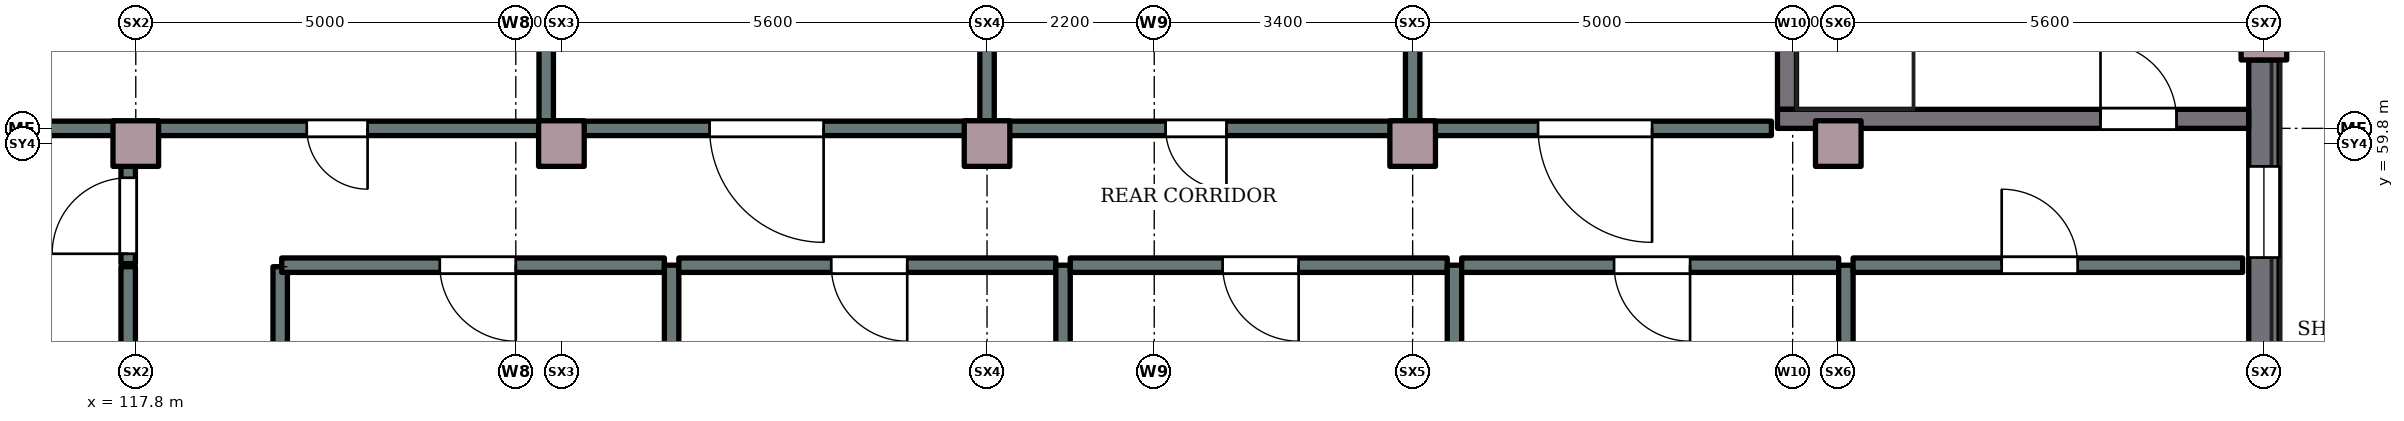
"""IFC4 building model, lengths in metres.
Left out: names, types, materials, properties, quantities, classifications, styles, units other than length and angle.
Written with IfcOpenShell. Run it as: python <this file> out.ifc"""

import sys

from ifc_helpers import new_model, si_unit, direction, frame, frame_2d, origin, origin_2d, place, context, subcontext, project, spatial, rectangle, extrude, element, fill, save


model = new_model("IFC4")
c1 = context("Model", 3, precision=1e-05, world=origin(), true_north=direction((0.0, 1.0)))
c2 = subcontext(c1, "Body", "Model", "MODEL_VIEW")
j1 = project(units=[si_unit("LENGTHUNIT", "METRE"), si_unit("PLANEANGLEUNIT", "RADIAN")], contexts=[c1])
p1 = place(None, origin())
s1 = spatial("IfcSite", under=j1, at=p1, CompositionType="ELEMENT")
p2 = place(p1, origin())
s2 = spatial("IfcBuilding", under=s1, at=p2, CompositionType="ELEMENT")
p3 = place(p2, origin())
s3 = spatial("IfcBuildingStorey", under=s2, at=p3, CompositionType="ELEMENT", Elevation=0.0)
for number, where, z_axis, x_axis in (
    (1, (145.8, 61.2, 0.0), (0.0, 0.0, 1.0), (1.0, 0.0, 0.0)),
    (2, (117.8, 59.8, 0.0), (0.0, 0.0, 1.0), (1.0, 0.0, 0.0)),
    (3, (123.4, 59.8, 0.0), (0.0, 0.0, 1.0), (1.0, 0.0, 0.0)),
    (4, (129.0, 59.8, 0.0), (0.0, 0.0, 1.0), (1.0, 0.0, 0.0)),
    (5, (134.6, 59.8, 0.0), (0.0, 0.0, 1.0), (1.0, 0.0, 0.0)),
    (6, (140.2, 59.8, 0.0), (0.0, 0.0, 1.0), (1.0, 0.0, 0.0)),
):
    element("IfcColumn", number, at=place(p3, frame(where, z_axis=z_axis, x_axis=x_axis)), inside=s3, PredefinedType="COLUMN", context=c2, shape_type="SweptSolid", body=[
        extrude(rectangle(XDim=0.6, YDim=0.6, at=origin_2d()), origin(), (0.0, 0.0, 1.0), 4.2),
    ])
p4 = place(p3, frame((145.8, 56.9, 0.0), z_axis=(0.0, 0.0, 1.0), x_axis=(0.0, 1.0, 0.0)))
e7 = element("IfcWall", 7, at=p4, inside=s3, PredefinedType="SOLIDWALL", context=c2, shape_type="SweptSolid", body=[
    extrude(rectangle(XDim=4.0, YDim=0.4, at=frame_2d((2.0, 0.0))), origin(), (0.0, 0.0, 1.0), 4.2),
])
p5 = place(p4, frame((1.4, 0.0, 1.2)))
e8 = element("IfcOpeningElement", 8, at=p5, cuts=e7, PredefinedType="OPENING", context=c2, shape_type="SweptSolid", body=[
    extrude(rectangle(XDim=1.2, YDim=1.8, at=frame_2d((0.6, 0.9))), frame((0.0, 0.21, 0.0), z_axis=(0.0, -1.0, 0.0), x_axis=(1.0, 0.0, 0.0)), (0.0, 0.0, 1.0), 0.42),
])
p6 = place(p3, frame((139.525, 60.25, 0.0), z_axis=(0.0, 0.0, 1.0), x_axis=(0.0, 1.0, 0.0)))
e9 = element("IfcWall", 9, at=p6, inside=s3, PredefinedType="SHEAR", context=c2, shape_type="SweptSolid", body=[
    extrude(rectangle(XDim=5.35, YDim=0.25, at=frame_2d((2.675, 0.0))), origin(), (0.0, 0.0, 1.0), 4.2),
])
p7 = place(p3, frame((139.4, 60.125, 0.0), z_axis=(0.0, 0.0, 1.0), x_axis=(1.0, 0.0, 0.0)))
e10 = element("IfcWall", 10, at=p7, inside=s3, PredefinedType="SHEAR", context=c2, shape_type="SweptSolid", body=[
    extrude(rectangle(XDim=6.2, YDim=0.25, at=frame_2d((3.1, 0.0))), origin(), (0.0, 0.0, 1.0), 4.2),
])
p8 = place(p7, frame((4.25, 0.0, 0.0)))
e11 = element("IfcOpeningElement", 11, at=p8, cuts=e10, PredefinedType="OPENING", context=c2, shape_type="SweptSolid", body=[
    extrude(rectangle(XDim=1.0, YDim=2.1, at=frame_2d((0.5, 1.05))), frame((0.0, 0.135, 0.0), z_axis=(0.0, -1.0, 0.0), x_axis=(1.0, 0.0, 0.0)), (0.0, 0.0, 1.0), 0.27),
])
p9 = place(p3, frame((117.605, 60.0, 0.0), z_axis=(0.0, 0.0, 1.0), x_axis=(-1.0, 0.0, 0.0)))
e12 = element("IfcWall", 12, at=p9, inside=s3, PredefinedType="PARTITIONING", context=c2, shape_type="SweptSolid", body=[
    extrude(rectangle(XDim=5.125, YDim=0.19, at=frame_2d((2.562, 0.0))), origin(), (0.0, 0.0, 1.0), 3.9),
])
p10 = place(p3, frame((117.7, 46.6, 0.0), z_axis=(0.0, 0.0, 1.0), x_axis=(0.0, 1.0, 0.0)))
e13 = element("IfcWall", 13, at=p10, inside=s3, PredefinedType="PARTITIONING", context=c2, shape_type="SweptSolid", body=[
    extrude(rectangle(XDim=11.58, YDim=0.19, at=frame_2d((5.79, 0.0))), origin(), (0.0, 0.0, 1.0), 3.9),
])
p11 = place(p10, frame((5.35, 0.0, 0.0)))
e14 = element("IfcOpeningElement", 14, at=p11, cuts=e13, PredefinedType="OPENING", context=c2, shape_type="SweptSolid", body=[
    extrude(rectangle(XDim=1.0, YDim=2.1, at=frame_2d((0.5, 1.05))), frame((0.0, 0.105, 0.0), z_axis=(0.0, -1.0, 0.0), x_axis=(1.0, 0.0, 0.0)), (0.0, 0.0, 1.0), 0.21),
])
p12 = place(p3, frame((117.7, 58.22, 0.0), z_axis=(0.0, 0.0, 1.0), x_axis=(0.0, 1.0, 0.0)))
e15 = element("IfcWall", 15, at=p12, inside=s3, PredefinedType="PARTITIONING", context=c2, shape_type="SweptSolid", body=[
    extrude(rectangle(XDim=1.78, YDim=0.19, at=frame_2d((0.89, 0.0))), origin(), (0.0, 0.0, 1.0), 3.9),
])
p13 = place(p12, frame((0.13, 0.0, 0.0)))
e16 = element("IfcOpeningElement", 16, at=p13, cuts=e15, PredefinedType="OPENING", context=c2, shape_type="SweptSolid", body=[
    extrude(rectangle(XDim=1.0, YDim=2.1, at=frame_2d((0.5, 1.05))), frame((0.0, 0.105, 0.0), z_axis=(0.0, -1.0, 0.0), x_axis=(1.0, 0.0, 0.0)), (0.0, 0.0, 1.0), 0.21),
])
p14 = place(p3, frame((119.7, 53.0, 0.0), z_axis=(0.0, 0.0, 1.0), x_axis=(0.0, 1.0, 0.0)))
e17 = element("IfcWall", 17, at=p14, inside=s3, PredefinedType="PARTITIONING", context=c2, shape_type="SweptSolid", body=[
    extrude(rectangle(XDim=5.18, YDim=0.19, at=frame_2d((2.59, 0.0))), origin(), (0.0, 0.0, 1.0), 3.9),
])
p15 = place(p14, frame((2.05, 0.0, 0.0)))
e18 = element("IfcOpeningElement", 18, at=p15, cuts=e17, PredefinedType="OPENING", context=c2, shape_type="SweptSolid", body=[
    extrude(rectangle(XDim=1.0, YDim=2.1, at=frame_2d((0.5, 1.05))), frame((0.0, 0.105, 0.0), z_axis=(0.0, -1.0, 0.0), x_axis=(1.0, 0.0, 0.0)), (0.0, 0.0, 1.0), 0.21),
])
p16 = place(p3, frame((123.2, 60.0, 0.0), z_axis=(0.0, 0.0, 1.0), x_axis=(-1.0, 0.0, 0.0)))
e19 = element("IfcWall", 19, at=p16, inside=s3, PredefinedType="PARTITIONING", context=c2, shape_type="SweptSolid", body=[
    extrude(rectangle(XDim=5.405, YDim=0.19, at=frame_2d((2.703, 0.0))), origin(), (0.0, 0.0, 1.0), 3.9),
])
p17 = place(p16, frame((2.35, 0.0, 0.0)))
e20 = element("IfcOpeningElement", 20, at=p17, cuts=e19, PredefinedType="OPENING", context=c2, shape_type="SweptSolid", body=[
    extrude(rectangle(XDim=0.8, YDim=2.1, at=frame_2d((0.4, 1.05))), frame((0.0, 0.105, 0.0), z_axis=(0.0, -1.0, 0.0), x_axis=(1.0, 0.0, 0.0)), (0.0, 0.0, 1.0), 0.21),
])
p18 = place(p3, frame((123.2, 60.095, 0.0), z_axis=(0.0, 0.0, 1.0), x_axis=(0.0, 1.0, 0.0)))
e21 = element("IfcWall", 21, at=p18, inside=s3, PredefinedType="PARTITIONING", context=c2, shape_type="SweptSolid", body=[
    extrude(rectangle(XDim=5.505, YDim=0.19, at=frame_2d((2.752, 0.0))), origin(), (0.0, 0.0, 1.0), 3.9),
])
p19 = place(p3, frame((124.755, 58.2, 0.0), z_axis=(0.0, 0.0, 1.0), x_axis=(-1.0, 0.0, 0.0)))
e22 = element("IfcWall", 22, at=p19, inside=s3, PredefinedType="PARTITIONING", context=c2, shape_type="SweptSolid", body=[
    extrude(rectangle(XDim=5.035, YDim=0.19, at=frame_2d((2.518, 0.0))), origin(), (0.0, 0.0, 1.0), 3.9),
])
p20 = place(p19, frame((1.955, 0.0, 0.0)))
e23 = element("IfcOpeningElement", 23, at=p20, cuts=e22, PredefinedType="OPENING", context=c2, shape_type="SweptSolid", body=[
    extrude(rectangle(XDim=1.0, YDim=2.1, at=frame_2d((0.5, 1.05))), frame((0.0, 0.105, 0.0), z_axis=(0.0, -1.0, 0.0), x_axis=(1.0, 0.0, 0.0)), (0.0, 0.0, 1.0), 0.21),
])
p21 = place(p3, frame((124.85, 53.095, 0.0), z_axis=(0.0, 0.0, 1.0), x_axis=(0.0, 1.0, 0.0)))
e24 = element("IfcWall", 24, at=p21, inside=s3, PredefinedType="PARTITIONING", context=c2, shape_type="SweptSolid", body=[
    extrude(rectangle(XDim=5.105, YDim=0.19, at=frame_2d((2.552, 0.0))), origin(), (0.0, 0.0, 1.0), 3.9),
])
p22 = place(p3, frame((129.0, 60.0, 0.0), z_axis=(0.0, 0.0, 1.0), x_axis=(-1.0, 0.0, 0.0)))
e25 = element("IfcWall", 25, at=p22, inside=s3, PredefinedType="PARTITIONING", context=c2, shape_type="SweptSolid", body=[
    extrude(rectangle(XDim=5.705, YDim=0.19, at=frame_2d((2.853, 0.0))), origin(), (0.0, 0.0, 1.0), 3.9),
])
p23 = place(p22, frame((2.15, 0.0, 0.0)))
e26 = element("IfcOpeningElement", 26, at=p23, cuts=e25, PredefinedType="OPENING", context=c2, shape_type="SweptSolid", body=[
    extrude(rectangle(XDim=1.5, YDim=2.1, at=frame_2d((0.75, 1.05))), frame((0.0, 0.105, 0.0), z_axis=(0.0, -1.0, 0.0), x_axis=(1.0, 0.0, 0.0)), (0.0, 0.0, 1.0), 0.21),
])
p24 = place(p3, frame((129.0, 60.095, 0.0), z_axis=(0.0, 0.0, 1.0), x_axis=(0.0, 1.0, 0.0)))
e27 = element("IfcWall", 27, at=p24, inside=s3, PredefinedType="PARTITIONING", context=c2, shape_type="SweptSolid", body=[
    extrude(rectangle(XDim=5.505, YDim=0.19, at=frame_2d((2.752, 0.0))), origin(), (0.0, 0.0, 1.0), 3.9),
])
p25 = place(p3, frame((129.905, 58.2, 0.0), z_axis=(0.0, 0.0, 1.0), x_axis=(-1.0, 0.0, 0.0)))
e28 = element("IfcWall", 28, at=p25, inside=s3, PredefinedType="PARTITIONING", context=c2, shape_type="SweptSolid", body=[
    extrude(rectangle(XDim=4.96, YDim=0.19, at=frame_2d((2.48, 0.0))), origin(), (0.0, 0.0, 1.0), 3.9),
])
p26 = place(p25, frame((1.955, 0.0, 0.0)))
e29 = element("IfcOpeningElement", 29, at=p26, cuts=e28, PredefinedType="OPENING", context=c2, shape_type="SweptSolid", body=[
    extrude(rectangle(XDim=1.0, YDim=2.1, at=frame_2d((0.5, 1.05))), frame((0.0, 0.105, 0.0), z_axis=(0.0, -1.0, 0.0), x_axis=(1.0, 0.0, 0.0)), (0.0, 0.0, 1.0), 0.21),
])
p27 = place(p3, frame((130.0, 53.095, 0.0), z_axis=(0.0, 0.0, 1.0), x_axis=(0.0, 1.0, 0.0)))
e30 = element("IfcWall", 30, at=p27, inside=s3, PredefinedType="PARTITIONING", context=c2, shape_type="SweptSolid", body=[
    extrude(rectangle(XDim=5.105, YDim=0.19, at=frame_2d((2.552, 0.0))), origin(), (0.0, 0.0, 1.0), 3.9),
])
p28 = place(p3, frame((134.6, 60.0, 0.0), z_axis=(0.0, 0.0, 1.0), x_axis=(-1.0, 0.0, 0.0)))
e31 = element("IfcWall", 31, at=p28, inside=s3, PredefinedType="PARTITIONING", context=c2, shape_type="SweptSolid", body=[
    extrude(rectangle(XDim=5.505, YDim=0.19, at=frame_2d((2.752, 0.0))), origin(), (0.0, 0.0, 1.0), 3.9),
])
p29 = place(p28, frame((2.45, 0.0, 0.0)))
e32 = element("IfcOpeningElement", 32, at=p29, cuts=e31, PredefinedType="OPENING", context=c2, shape_type="SweptSolid", body=[
    extrude(rectangle(XDim=0.8, YDim=2.1, at=frame_2d((0.4, 1.05))), frame((0.0, 0.105, 0.0), z_axis=(0.0, -1.0, 0.0), x_axis=(1.0, 0.0, 0.0)), (0.0, 0.0, 1.0), 0.21),
])
p30 = place(p3, frame((134.6, 60.095, 0.0), z_axis=(0.0, 0.0, 1.0), x_axis=(0.0, 1.0, 0.0)))
e33 = element("IfcWall", 33, at=p30, inside=s3, PredefinedType="PARTITIONING", context=c2, shape_type="SweptSolid", body=[
    extrude(rectangle(XDim=5.505, YDim=0.19, at=frame_2d((2.752, 0.0))), origin(), (0.0, 0.0, 1.0), 3.9),
])
p31 = place(p3, frame((135.055, 58.2, 0.0), z_axis=(0.0, 0.0, 1.0), x_axis=(-1.0, 0.0, 0.0)))
e34 = element("IfcWall", 34, at=p31, inside=s3, PredefinedType="PARTITIONING", context=c2, shape_type="SweptSolid", body=[
    extrude(rectangle(XDim=4.96, YDim=0.19, at=frame_2d((2.48, 0.0))), origin(), (0.0, 0.0, 1.0), 3.9),
])
p32 = place(p31, frame((1.955, 0.0, 0.0)))
e35 = element("IfcOpeningElement", 35, at=p32, cuts=e34, PredefinedType="OPENING", context=c2, shape_type="SweptSolid", body=[
    extrude(rectangle(XDim=1.0, YDim=2.1, at=frame_2d((0.5, 1.05))), frame((0.0, 0.105, 0.0), z_axis=(0.0, -1.0, 0.0), x_axis=(1.0, 0.0, 0.0)), (0.0, 0.0, 1.0), 0.21),
])
p33 = place(p3, frame((135.15, 53.095, 0.0), z_axis=(0.0, 0.0, 1.0), x_axis=(0.0, 1.0, 0.0)))
e36 = element("IfcWall", 36, at=p33, inside=s3, PredefinedType="PARTITIONING", context=c2, shape_type="SweptSolid", body=[
    extrude(rectangle(XDim=5.105, YDim=0.19, at=frame_2d((2.552, 0.0))), origin(), (0.0, 0.0, 1.0), 3.9),
])
p34 = place(p3, frame((139.32, 60.0, 0.0), z_axis=(0.0, 0.0, 1.0), x_axis=(-1.0, 0.0, 0.0)))
e37 = element("IfcWall", 37, at=p34, inside=s3, PredefinedType="PARTITIONING", context=c2, shape_type="SweptSolid", body=[
    extrude(rectangle(XDim=4.625, YDim=0.19, at=frame_2d((2.312, 0.0))), origin(), (0.0, 0.0, 1.0), 3.9),
])
p35 = place(p34, frame((1.57, 0.0, 0.0)))
e38 = element("IfcOpeningElement", 38, at=p35, cuts=e37, PredefinedType="OPENING", context=c2, shape_type="SweptSolid", body=[
    extrude(rectangle(XDim=1.5, YDim=2.1, at=frame_2d((0.75, 1.05))), frame((0.0, 0.105, 0.0), z_axis=(0.0, -1.0, 0.0), x_axis=(1.0, 0.0, 0.0)), (0.0, 0.0, 1.0), 0.21),
])
p36 = place(p3, frame((140.205, 58.2, 0.0), z_axis=(0.0, 0.0, 1.0), x_axis=(-1.0, 0.0, 0.0)))
e39 = element("IfcWall", 39, at=p36, inside=s3, PredefinedType="PARTITIONING", context=c2, shape_type="SweptSolid", body=[
    extrude(rectangle(XDim=4.96, YDim=0.19, at=frame_2d((2.48, 0.0))), origin(), (0.0, 0.0, 1.0), 3.9),
])
p37 = place(p36, frame((1.955, 0.0, 0.0)))
e40 = element("IfcOpeningElement", 40, at=p37, cuts=e39, PredefinedType="OPENING", context=c2, shape_type="SweptSolid", body=[
    extrude(rectangle(XDim=1.0, YDim=2.1, at=frame_2d((0.5, 1.05))), frame((0.0, 0.105, 0.0), z_axis=(0.0, -1.0, 0.0), x_axis=(1.0, 0.0, 0.0)), (0.0, 0.0, 1.0), 0.21),
])
p38 = place(p3, frame((140.3, 53.095, 0.0), z_axis=(0.0, 0.0, 1.0), x_axis=(0.0, 1.0, 0.0)))
e41 = element("IfcWall", 41, at=p38, inside=s3, PredefinedType="PARTITIONING", context=c2, shape_type="SweptSolid", body=[
    extrude(rectangle(XDim=5.105, YDim=0.19, at=frame_2d((2.552, 0.0))), origin(), (0.0, 0.0, 1.0), 3.9),
])
p39 = place(p3, frame((140.395, 58.2, 0.0), z_axis=(0.0, 0.0, 1.0), x_axis=(1.0, 0.0, 0.0)))
e42 = element("IfcWall", 42, at=p39, inside=s3, PredefinedType="PARTITIONING", context=c2, shape_type="SweptSolid", body=[
    extrude(rectangle(XDim=5.125, YDim=0.19, at=frame_2d((2.562, 0.0))), origin(), (0.0, 0.0, 1.0), 3.9),
])
p40 = place(p39, frame((1.955, 0.0, 0.0)))
e43 = element("IfcOpeningElement", 43, at=p40, cuts=e42, PredefinedType="OPENING", context=c2, shape_type="SweptSolid", body=[
    extrude(rectangle(XDim=1.0, YDim=2.1, at=frame_2d((0.5, 1.05))), frame((0.0, 0.105, 0.0), z_axis=(0.0, -1.0, 0.0), x_axis=(1.0, 0.0, 0.0)), (0.0, 0.0, 1.0), 0.21),
])
p41 = place(p3, frame((145.6, 60.98, 0.0), z_axis=(0.0, 0.0, 1.0), x_axis=(0.0, 1.0, 0.0)))
e44 = element("IfcWall", 44, at=p41, inside=s3, PredefinedType="PARTITIONING", context=c2, shape_type="SweptSolid", body=[
    extrude(rectangle(XDim=0.44, YDim=0.19, at=frame_2d((0.22, 0.0))), origin(), (0.0, 0.0, 1.0), 3.9),
])
p42 = place(p5, origin())
e45 = element("IfcWindow", 45, at=p42, inside=s3, PartitioningType="SINGLE_PANEL", PredefinedType="WINDOW", context=c2, shape_type="SweptSolid", body=[
    extrude(rectangle(XDim=1.2, YDim=1.8, at=frame_2d((0.6, 0.9))), frame((0.0, 0.03, 0.0), z_axis=(0.0, -1.0, 0.0), x_axis=(1.0, 0.0, 0.0)), (0.0, 0.0, 1.0), 0.06),
])
fill(e8, e45)
p43 = place(p13, origin())
e46 = element("IfcDoor", 46, at=p43, inside=s3, OperationType="SINGLE_SWING_LEFT", PredefinedType="DOOR", context=c2, shape_type="SweptSolid", body=[
    extrude(rectangle(XDim=1.0, YDim=2.1, at=frame_2d((0.5, 1.05))), frame((0.0, 0.025, 0.0), z_axis=(0.0, -1.0, 0.0), x_axis=(1.0, 0.0, 0.0)), (0.0, 0.0, 1.0), 0.05),
])
fill(e16, e46)
p44 = place(p20, origin())
e47 = element("IfcDoor", 47, at=p44, inside=s3, OperationType="SINGLE_SWING_LEFT", PredefinedType="DOOR", context=c2, shape_type="SweptSolid", body=[
    extrude(rectangle(XDim=1.0, YDim=2.1, at=frame_2d((0.5, 1.05))), frame((0.0, 0.025, 0.0), z_axis=(0.0, -1.0, 0.0), x_axis=(1.0, 0.0, 0.0)), (0.0, 0.0, 1.0), 0.05),
])
fill(e23, e47)
p45 = place(p26, origin())
e48 = element("IfcDoor", 48, at=p45, inside=s3, OperationType="SINGLE_SWING_LEFT", PredefinedType="DOOR", context=c2, shape_type="SweptSolid", body=[
    extrude(rectangle(XDim=1.0, YDim=2.1, at=frame_2d((0.5, 1.05))), frame((0.0, 0.025, 0.0), z_axis=(0.0, -1.0, 0.0), x_axis=(1.0, 0.0, 0.0)), (0.0, 0.0, 1.0), 0.05),
])
fill(e29, e48)
p46 = place(p32, origin())
e49 = element("IfcDoor", 49, at=p46, inside=s3, OperationType="SINGLE_SWING_LEFT", PredefinedType="DOOR", context=c2, shape_type="SweptSolid", body=[
    extrude(rectangle(XDim=1.0, YDim=2.1, at=frame_2d((0.5, 1.05))), frame((0.0, 0.025, 0.0), z_axis=(0.0, -1.0, 0.0), x_axis=(1.0, 0.0, 0.0)), (0.0, 0.0, 1.0), 0.05),
])
fill(e35, e49)
p47 = place(p37, origin())
e50 = element("IfcDoor", 50, at=p47, inside=s3, OperationType="SINGLE_SWING_LEFT", PredefinedType="DOOR", context=c2, shape_type="SweptSolid", body=[
    extrude(rectangle(XDim=1.0, YDim=2.1, at=frame_2d((0.5, 1.05))), frame((0.0, 0.025, 0.0), z_axis=(0.0, -1.0, 0.0), x_axis=(1.0, 0.0, 0.0)), (0.0, 0.0, 1.0), 0.05),
])
fill(e40, e50)
p48 = place(p8, origin())
e51 = element("IfcDoor", 51, at=p48, inside=s3, OperationType="SINGLE_SWING_LEFT", PredefinedType="DOOR", context=c2, shape_type="SweptSolid", body=[
    extrude(rectangle(XDim=1.0, YDim=2.1, at=frame_2d((0.5, 1.05))), frame((0.0, 0.025, 0.0), z_axis=(0.0, -1.0, 0.0), x_axis=(1.0, 0.0, 0.0)), (0.0, 0.0, 1.0), 0.05),
])
fill(e11, e51)
p49 = place(p40, origin())
e52 = element("IfcDoor", 52, at=p49, inside=s3, OperationType="SINGLE_SWING_LEFT", PredefinedType="DOOR", context=c2, shape_type="SweptSolid", body=[
    extrude(rectangle(XDim=1.0, YDim=2.1, at=frame_2d((0.5, 1.05))), frame((0.0, 0.025, 0.0), z_axis=(0.0, -1.0, 0.0), x_axis=(1.0, 0.0, 0.0)), (0.0, 0.0, 1.0), 0.05),
])
fill(e43, e52)
p50 = place(p17, origin())
e53 = element("IfcDoor", 53, at=p50, inside=s3, OperationType="SINGLE_SWING_LEFT", PredefinedType="DOOR", context=c2, shape_type="SweptSolid", body=[
    extrude(rectangle(XDim=0.8, YDim=2.1, at=frame_2d((0.4, 1.05))), frame((0.0, 0.025, 0.0), z_axis=(0.0, -1.0, 0.0), x_axis=(1.0, 0.0, 0.0)), (0.0, 0.0, 1.0), 0.05),
])
fill(e20, e53)
p51 = place(p23, origin())
e54 = element("IfcDoor", 54, at=p51, inside=s3, OperationType="DOUBLE_DOOR_SINGLE_SWING", PredefinedType="DOOR", context=c2, shape_type="SweptSolid", body=[
    extrude(rectangle(XDim=1.5, YDim=2.1, at=frame_2d((0.75, 1.05))), frame((0.0, 0.025, 0.0), z_axis=(0.0, -1.0, 0.0), x_axis=(1.0, 0.0, 0.0)), (0.0, 0.0, 1.0), 0.05),
])
fill(e26, e54)
p52 = place(p29, origin())
e55 = element("IfcDoor", 55, at=p52, inside=s3, OperationType="SINGLE_SWING_LEFT", PredefinedType="DOOR", context=c2, shape_type="SweptSolid", body=[
    extrude(rectangle(XDim=0.8, YDim=2.1, at=frame_2d((0.4, 1.05))), frame((0.0, 0.025, 0.0), z_axis=(0.0, -1.0, 0.0), x_axis=(1.0, 0.0, 0.0)), (0.0, 0.0, 1.0), 0.05),
])
fill(e32, e55)
p53 = place(p35, origin())
e56 = element("IfcDoor", 56, at=p53, inside=s3, OperationType="DOUBLE_DOOR_SINGLE_SWING", PredefinedType="DOOR", context=c2, shape_type="SweptSolid", body=[
    extrude(rectangle(XDim=1.5, YDim=2.1, at=frame_2d((0.75, 1.05))), frame((0.0, 0.025, 0.0), z_axis=(0.0, -1.0, 0.0), x_axis=(1.0, 0.0, 0.0)), (0.0, 0.0, 1.0), 0.05),
])
fill(e38, e56)
save(model, sys.argv[1])
